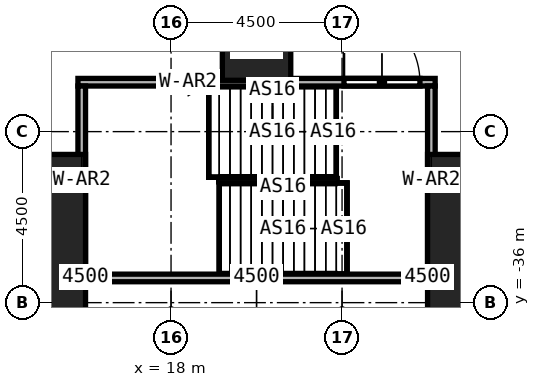
"""IFC4 building model, lengths in metres.
Left out: names, types, materials, properties, quantities, classifications, styles, units other than length and angle.
Written with IfcOpenShell. Run it as: python <this file> out.ifc"""

import sys

from ifc_helpers import new_model, si_unit, direction, frame, frame_2d, origin, origin_2d, place, context, subcontext, project, spatial, rectangle, extrude, element, fill, save


model = new_model("IFC4")
c1 = context("Model", 3, precision=1e-05, world=origin(), true_north=direction((0.0, 1.0)))
c2 = subcontext(c1, "Body", "Model", "MODEL_VIEW")
j1 = project(units=[si_unit("LENGTHUNIT", "METRE"), si_unit("PLANEANGLEUNIT", "RADIAN")], contexts=[c1])
p1 = place(None, origin())
s1 = spatial("IfcSite", under=j1, at=p1, CompositionType="ELEMENT")
p2 = place(p1, origin())
s2 = spatial("IfcBuilding", under=s1, at=p2, CompositionType="ELEMENT")
p3 = place(p2, origin())
s3 = spatial("IfcBuildingStorey", under=s2, at=p3, CompositionType="ELEMENT", Elevation=0.0)
for number, where, z_axis, x_axis in (
    (1, (13.5, -35.55, 0.0), (0.0, 0.0, 1.0), (1.0, 0.0, 0.0)),
    (2, (27.0, -35.55, 0.0), (0.0, 0.0, 1.0), (1.0, 0.0, 0.0)),
):
    element("IfcColumn", number, at=place(p3, frame(where, z_axis=z_axis, x_axis=x_axis)), inside=s3, PredefinedType="COLUMN", context=c2, shape_type="SweptSolid", body=[
        extrude(rectangle(XDim=4.5, YDim=6.9, at=origin_2d()), origin(), (0.0, 0.0, 1.0), 12.0),
    ])
p4 = place(p3, frame((20.25, -29.25, 0.0), z_axis=(0.0, 0.0, 1.0), x_axis=(1.0, 0.0, 0.0)))
e3 = element("IfcColumn", 3, at=p4, inside=s3, PredefinedType="COLUMN", context=c2, shape_type="SweptSolid", body=[
    extrude(rectangle(XDim=1.8, YDim=1.8, at=origin_2d()), origin(), (0.0, 0.0, 1.0), 12.0),
])
p5 = place(p3, frame((15.55, -30.2, 0.0), z_axis=(0.0, 0.0, 1.0), x_axis=(1.0, 0.0, 0.0)))
e4 = element("IfcWall", 4, at=p5, inside=s3, PredefinedType="SOLIDWALL", context=c2, shape_type="SweptSolid", body=[
    extrude(rectangle(XDim=9.4, YDim=0.2, at=frame_2d((4.7, 0.0))), origin(), (0.0, 0.0, 1.0), 12.0),
])
p6 = place(p5, frame((7.0, 0.0, 0.0)))
e5 = element("IfcOpeningElement", 5, at=p6, cuts=e4, PredefinedType="OPENING", context=c2, shape_type="SweptSolid", body=[
    extrude(rectangle(XDim=2.0, YDim=2.4, at=frame_2d((1.0, 1.2))), frame((0.0, 0.1, 0.0), z_axis=(0.0, -1.0, 0.0), x_axis=(1.0, 0.0, 0.0)), (0.0, 0.0, 1.0), 0.2),
])
p7 = place(p3, frame((15.55, -35.35, 0.0), z_axis=(0.0, 0.0, 1.0), x_axis=(1.0, 0.0, 0.0)))
e6 = element("IfcWall", 6, at=p7, inside=s3, PredefinedType="SOLIDWALL", context=c2, shape_type="SweptSolid", body=[
    extrude(rectangle(XDim=9.4, YDim=0.2, at=frame_2d((4.7, 0.0))), origin(), (0.0, 0.0, 1.0), 12.0),
])
for number, where, z_axis, x_axis in (
    (7, (15.65, -35.25, 0.0), (0.0, 0.0, 1.0), (0.0, 1.0, 0.0)),
    (8, (24.85, -35.25, 0.0), (0.0, 0.0, 1.0), (0.0, 1.0, 0.0)),
):
    element("IfcWall", number, at=place(p3, frame(where, z_axis=z_axis, x_axis=x_axis)), inside=s3, PredefinedType="SOLIDWALL", context=c2, shape_type="SweptSolid", body=[
        extrude(rectangle(XDim=4.95, YDim=0.2, at=frame_2d((2.475, 0.0))), origin(), (0.0, 0.0, 1.0), 12.0),
    ])
p8 = place(p6, origin())
e9 = element("IfcDoor", 9, at=p8, inside=s3, OperationType="DOUBLE_DOOR_SINGLE_SWING", PredefinedType="DOOR", context=c2, shape_type="SweptSolid", body=[
    extrude(rectangle(XDim=2.0, YDim=2.4, at=frame_2d((1.0, 1.2))), frame((0.0, 0.025, 0.0), z_axis=(0.0, -1.0, 0.0), x_axis=(1.0, 0.0, 0.0)), (0.0, 0.0, 1.0), 0.05),
])
fill(e5, e9)
save(model, sys.argv[1])
